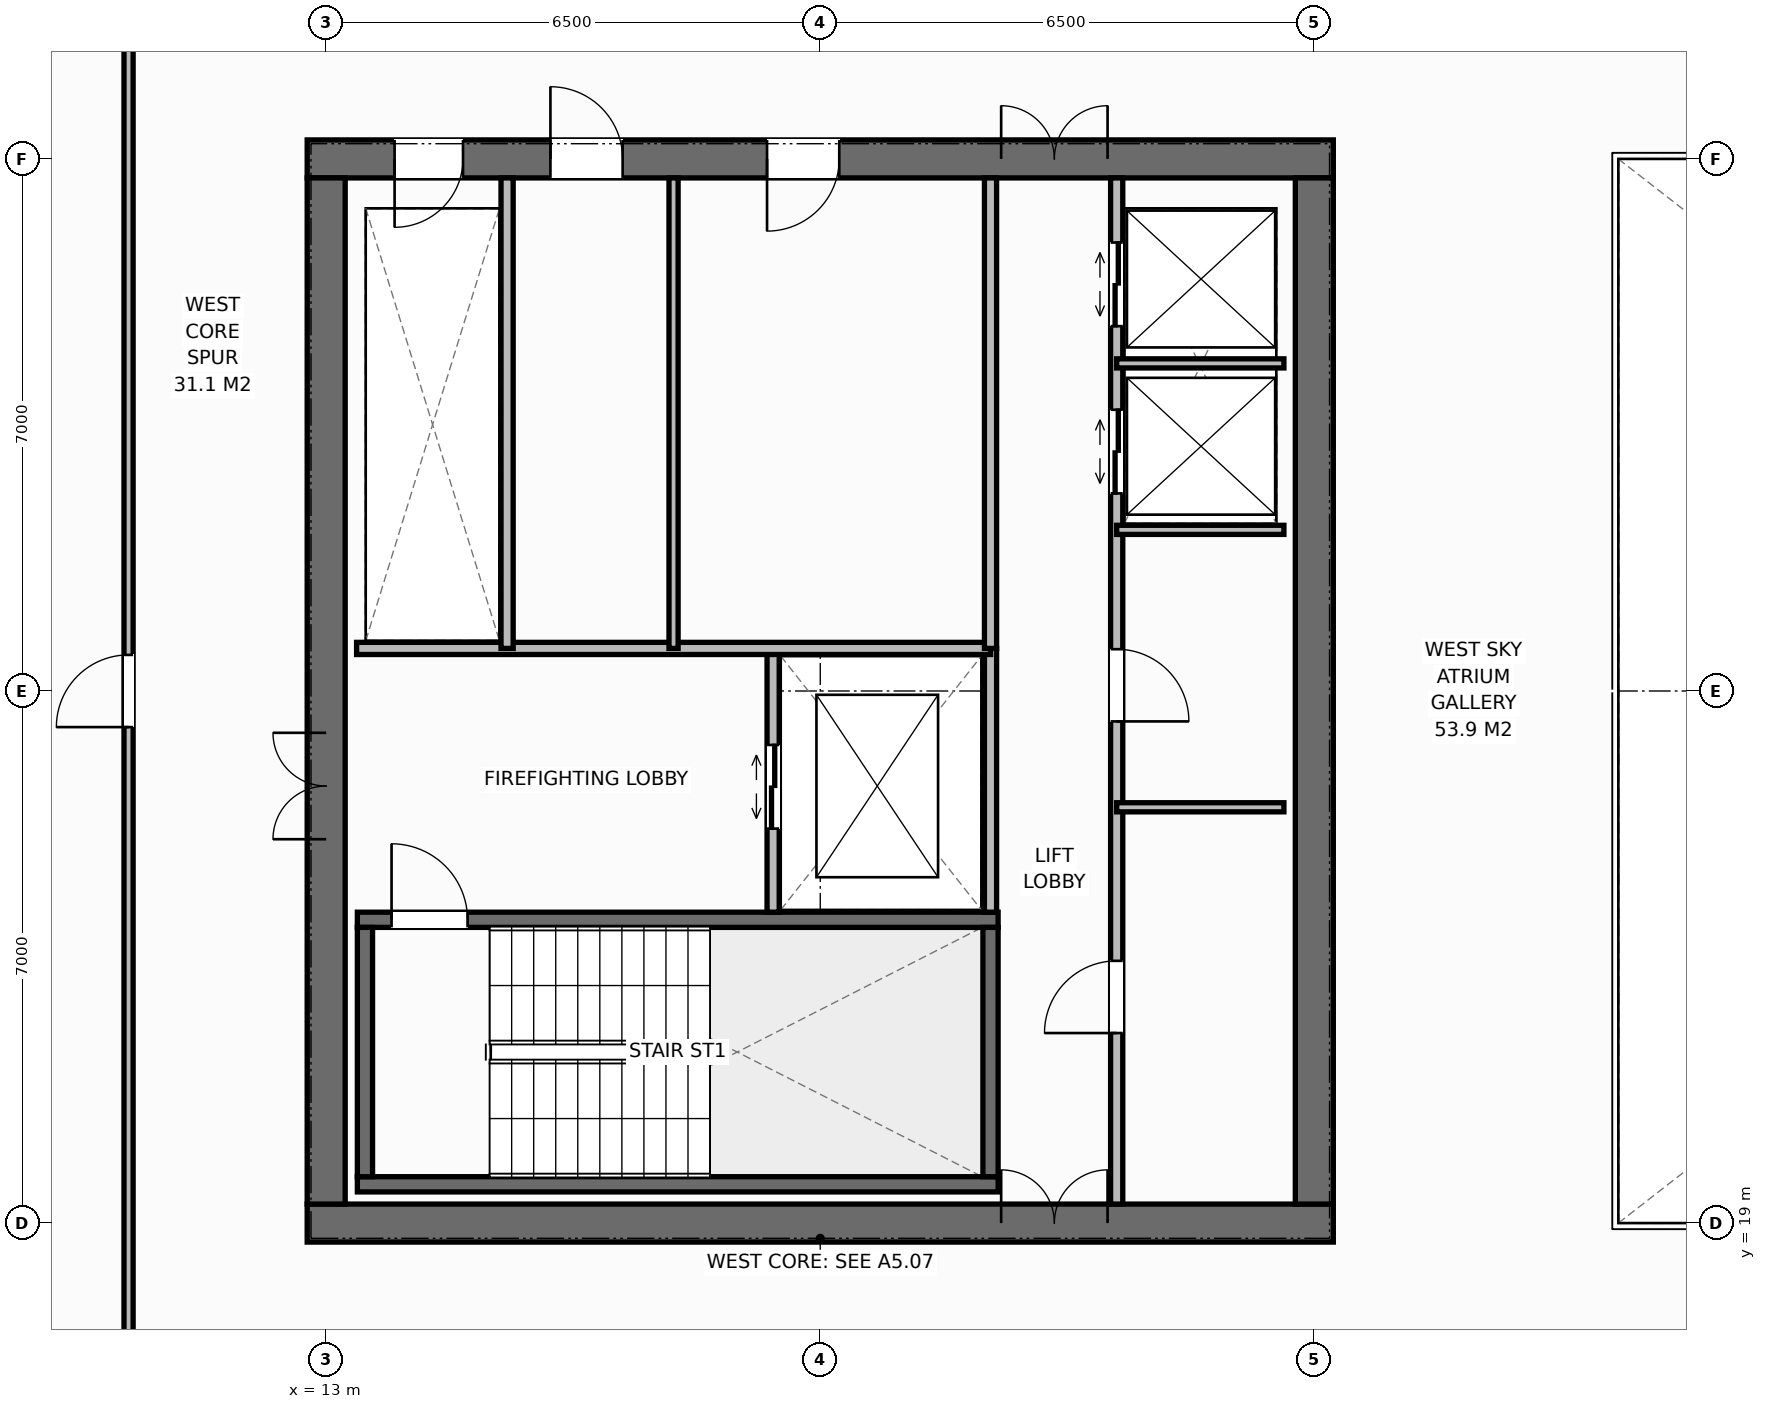
"""IFC4 building model, lengths in metres.
Left out: names, types, materials, properties, quantities, classifications, styles, units other than length and angle.
Written with IfcOpenShell. Run it as: python <this file> out.ifc"""

import sys

from ifc_helpers import new_model, si_unit, direction, frame, frame_2d, origin, place, context, subcontext, project, spatial, rectangle, extrude, element, fill, save


model = new_model("IFC4")
c1 = context("Model", 3, precision=1e-05, world=origin(), true_north=direction((0.0, 1.0)))
c2 = subcontext(c1, "Body", "Model", "MODEL_VIEW")
j1 = project(units=[si_unit("LENGTHUNIT", "METRE"), si_unit("PLANEANGLEUNIT", "RADIAN")], contexts=[c1])
p1 = place(None, origin())
s1 = spatial("IfcSite", under=j1, at=p1, CompositionType="ELEMENT")
p2 = place(p1, origin())
s2 = spatial("IfcBuilding", under=s1, at=p2, CompositionType="ELEMENT")
p3 = place(p2, frame((0.0, 0.0, 202.4)))
s3 = spatial("IfcBuildingStorey", under=s2, at=p3, CompositionType="ELEMENT", Elevation=202.4)
p4 = place(p3, frame((12.75, 19.0, 0.0), z_axis=(0.0, 0.0, 1.0), x_axis=(1.0, 0.0, 0.0)))
e1 = element("IfcWall", 1, at=p4, inside=s3, PredefinedType="SHEAR", context=c2, shape_type="SweptSolid", body=[
    extrude(rectangle(XDim=13.5, YDim=0.5, at=frame_2d((6.75, 0.0))), origin(), (0.0, 0.0, 1.0), 3.8),
])
p5 = place(p4, frame((9.13, 0.0, 0.0)))
e2 = element("IfcOpeningElement", 2, at=p5, cuts=e1, PredefinedType="OPENING", context=c2, shape_type="SweptSolid", body=[
    extrude(rectangle(XDim=1.4, YDim=2.2, at=frame_2d((0.7, 1.1))), frame((0.0, 0.26, 0.0), z_axis=(0.0, -1.0, 0.0), x_axis=(1.0, 0.0, 0.0)), (0.0, 0.0, 1.0), 0.52),
])
p6 = place(p3, frame((12.75, 33.0, 0.0), z_axis=(0.0, 0.0, 1.0), x_axis=(1.0, 0.0, 0.0)))
e3 = element("IfcWall", 3, at=p6, inside=s3, PredefinedType="SHEAR", context=c2, shape_type="SweptSolid", body=[
    extrude(rectangle(XDim=13.5, YDim=0.5, at=frame_2d((6.75, 0.0))), origin(), (0.0, 0.0, 1.0), 3.8),
])
p7 = place(p6, frame((1.15, 0.0, 0.0)))
e4 = element("IfcOpeningElement", 4, at=p7, cuts=e3, PredefinedType="OPENING", context=c2, shape_type="SweptSolid", body=[
    extrude(rectangle(XDim=0.9, YDim=2.15, at=frame_2d((0.45, 1.075))), frame((0.0, 0.26, 0.0), z_axis=(0.0, -1.0, 0.0), x_axis=(1.0, 0.0, 0.0)), (0.0, 0.0, 1.0), 0.52),
])
p8 = place(p6, frame((3.2, 0.0, 0.0)))
e5 = element("IfcOpeningElement", 5, at=p8, cuts=e3, PredefinedType="OPENING", context=c2, shape_type="SweptSolid", body=[
    extrude(rectangle(XDim=0.95, YDim=2.15, at=frame_2d((0.475, 1.075))), frame((0.0, 0.26, 0.0), z_axis=(0.0, -1.0, 0.0), x_axis=(1.0, 0.0, 0.0)), (0.0, 0.0, 1.0), 0.52),
])
p9 = place(p6, frame((6.05, 0.0, 0.0)))
e6 = element("IfcOpeningElement", 6, at=p9, cuts=e3, PredefinedType="OPENING", context=c2, shape_type="SweptSolid", body=[
    extrude(rectangle(XDim=0.95, YDim=2.15, at=frame_2d((0.475, 1.075))), frame((0.0, 0.26, 0.0), z_axis=(0.0, -1.0, 0.0), x_axis=(1.0, 0.0, 0.0)), (0.0, 0.0, 1.0), 0.52),
])
p10 = place(p6, frame((9.13, 0.0, 0.0)))
e7 = element("IfcOpeningElement", 7, at=p10, cuts=e3, PredefinedType="OPENING", context=c2, shape_type="SweptSolid", body=[
    extrude(rectangle(XDim=1.4, YDim=2.2, at=frame_2d((0.7, 1.1))), frame((0.0, 0.26, 0.0), z_axis=(0.0, -1.0, 0.0), x_axis=(1.0, 0.0, 0.0)), (0.0, 0.0, 1.0), 0.52),
])
p11 = place(p3, frame((13.0, 19.25, 0.0), z_axis=(0.0, 0.0, 1.0), x_axis=(0.0, 1.0, 0.0)))
e8 = element("IfcWall", 8, at=p11, inside=s3, PredefinedType="SHEAR", context=c2, shape_type="SweptSolid", body=[
    extrude(rectangle(XDim=13.5, YDim=0.5, at=frame_2d((6.75, 0.0))), origin(), (0.0, 0.0, 1.0), 3.8),
])
p12 = place(p11, frame((4.8, 0.0, 0.0)))
e9 = element("IfcOpeningElement", 9, at=p12, cuts=e8, PredefinedType="OPENING", context=c2, shape_type="SweptSolid", body=[
    extrude(rectangle(XDim=1.4, YDim=2.2, at=frame_2d((0.7, 1.1))), frame((0.0, 0.26, 0.0), z_axis=(0.0, -1.0, 0.0), x_axis=(1.0, 0.0, 0.0)), (0.0, 0.0, 1.0), 0.52),
])
p13 = place(p3, frame((26.0, 19.25, 0.0), z_axis=(0.0, 0.0, 1.0), x_axis=(0.0, 1.0, 0.0)))
e10 = element("IfcWall", 10, at=p13, inside=s3, PredefinedType="SHEAR", context=c2, shape_type="SweptSolid", body=[
    extrude(rectangle(XDim=13.5, YDim=0.5, at=frame_2d((6.75, 0.0))), origin(), (0.0, 0.0, 1.0), 3.8),
])
p14 = place(p3, frame((13.41, 19.51, 0.0), z_axis=(0.0, 0.0, 1.0), x_axis=(1.0, 0.0, 0.0)))
e11 = element("IfcWall", 11, at=p14, inside=s3, PredefinedType="SHEAR", context=c2, shape_type="SweptSolid", body=[
    extrude(rectangle(XDim=8.43, YDim=0.2, at=frame_2d((4.215, 0.0))), origin(), (0.0, 0.0, 1.0), 3.8),
])
p15 = place(p3, frame((13.41, 22.99, 0.0), z_axis=(0.0, 0.0, 1.0), x_axis=(1.0, 0.0, 0.0)))
e12 = element("IfcWall", 12, at=p15, inside=s3, PredefinedType="SHEAR", context=c2, shape_type="SweptSolid", body=[
    extrude(rectangle(XDim=8.43, YDim=0.2, at=frame_2d((4.215, 0.0))), origin(), (0.0, 0.0, 1.0), 3.8),
])
p16 = place(p15, frame((0.45, 0.0, 0.0)))
e13 = element("IfcOpeningElement", 13, at=p16, cuts=e12, PredefinedType="OPENING", context=c2, shape_type="SweptSolid", body=[
    extrude(rectangle(XDim=1.0, YDim=2.15, at=frame_2d((0.5, 1.075))), frame((0.0, 0.11, 0.0), z_axis=(0.0, -1.0, 0.0), x_axis=(1.0, 0.0, 0.0)), (0.0, 0.0, 1.0), 0.22),
])
for number, where, z_axis, x_axis in (
    (14, (13.51, 19.61, 0.0), (0.0, 0.0, 1.0), (0.0, 1.0, 0.0)),
    (15, (21.74, 19.61, 0.0), (0.0, 0.0, 1.0), (0.0, 1.0, 0.0)),
):
    element("IfcWall", number, at=place(p3, frame(where, z_axis=z_axis, x_axis=x_axis)), inside=s3, PredefinedType="SHEAR", context=c2, shape_type="SweptSolid", body=[
        extrude(rectangle(XDim=3.28, YDim=0.2, at=frame_2d((1.64, 0.0))), origin(), (0.0, 0.0, 1.0), 3.8),
    ])
p17 = place(p3, frame((21.74, 23.09, 0.0), z_axis=(0.0, 0.0, 1.0), x_axis=(0.0, 1.0, 0.0)))
e16 = element("IfcWall", 16, at=p17, inside=s3, PredefinedType="STANDARD", context=c2, shape_type="SweptSolid", body=[
    extrude(rectangle(XDim=3.47, YDim=0.16, at=frame_2d((1.735, 0.0))), origin(), (0.0, 0.0, 1.0), 3.58),
])
p18 = place(p3, frame((18.88, 23.09, 0.0), z_axis=(0.0, 0.0, 1.0), x_axis=(0.0, 1.0, 0.0)))
e17 = element("IfcWall", 17, at=p18, inside=s3, PredefinedType="STANDARD", context=c2, shape_type="SweptSolid", body=[
    extrude(rectangle(XDim=3.47, YDim=0.16, at=frame_2d((1.735, 0.0))), origin(), (0.0, 0.0, 1.0), 3.58),
])
p19 = place(p18, frame((1.1, 0.0, 0.0)))
e18 = element("IfcOpeningElement", 18, at=p19, cuts=e17, PredefinedType="OPENING", context=c2, shape_type="SweptSolid", body=[
    extrude(rectangle(XDim=1.1, YDim=2.2, at=frame_2d((0.55, 1.1))), frame((0.0, 0.09, 0.0), z_axis=(0.0, -1.0, 0.0), x_axis=(1.0, 0.0, 0.0)), (0.0, 0.0, 1.0), 0.18),
])
p20 = place(p3, frame((13.4, 26.56, 0.0), z_axis=(0.0, 0.0, 1.0), x_axis=(1.0, 0.0, 0.0)))
e19 = element("IfcWall", 19, at=p20, inside=s3, PredefinedType="STANDARD", context=c2, shape_type="SweptSolid", body=[
    extrude(rectangle(XDim=8.34, YDim=0.16, at=frame_2d((4.17, 0.0))), origin(), (0.0, 0.0, 1.0), 3.58),
])
p21 = place(p3, frame((15.38, 26.56, 0.0), z_axis=(0.0, 0.0, 1.0), x_axis=(0.0, 1.0, 0.0)))
e20 = element("IfcWall", 20, at=p21, inside=s3, PredefinedType="STANDARD", context=c2, shape_type="SweptSolid", body=[
    extrude(rectangle(XDim=6.19, YDim=0.16, at=frame_2d((3.095, 0.0))), origin(), (0.0, 0.0, 1.0), 3.58),
])
p22 = place(p3, frame((17.57, 26.56, 0.0), z_axis=(0.0, 0.0, 1.0), x_axis=(0.0, 1.0, 0.0)))
e21 = element("IfcWall", 21, at=p22, inside=s3, PredefinedType="PARTITIONING", context=c2, shape_type="SweptSolid", body=[
    extrude(rectangle(XDim=6.19, YDim=0.12, at=frame_2d((3.095, 0.0))), origin(), (0.0, 0.0, 1.0), 3.58),
])
p23 = place(p3, frame((21.74, 26.56, 0.0), z_axis=(0.0, 0.0, 1.0), x_axis=(0.0, 1.0, 0.0)))
e22 = element("IfcWall", 22, at=p23, inside=s3, PredefinedType="STANDARD", context=c2, shape_type="SweptSolid", body=[
    extrude(rectangle(XDim=6.19, YDim=0.16, at=frame_2d((3.095, 0.0))), origin(), (0.0, 0.0, 1.0), 3.58),
])
p24 = place(p3, frame((23.4, 19.25, 0.0), z_axis=(0.0, 0.0, 1.0), x_axis=(0.0, 1.0, 0.0)))
e23 = element("IfcWall", 23, at=p24, inside=s3, PredefinedType="STANDARD", context=c2, shape_type="SweptSolid", body=[
    extrude(rectangle(XDim=13.5, YDim=0.16, at=frame_2d((6.75, 0.0))), origin(), (0.0, 0.0, 1.0), 3.58),
])
p25 = place(p24, frame((2.25, 0.0, 0.0)))
e24 = element("IfcOpeningElement", 24, at=p25, cuts=e23, PredefinedType="OPENING", context=c2, shape_type="SweptSolid", body=[
    extrude(rectangle(XDim=0.95, YDim=2.15, at=frame_2d((0.475, 1.075))), frame((0.0, 0.09, 0.0), z_axis=(0.0, -1.0, 0.0), x_axis=(1.0, 0.0, 0.0)), (0.0, 0.0, 1.0), 0.18),
])
p26 = place(p24, frame((6.35, 0.0, 0.0)))
e25 = element("IfcOpeningElement", 25, at=p26, cuts=e23, PredefinedType="OPENING", context=c2, shape_type="SweptSolid", body=[
    extrude(rectangle(XDim=0.95, YDim=2.15, at=frame_2d((0.475, 1.075))), frame((0.0, 0.09, 0.0), z_axis=(0.0, -1.0, 0.0), x_axis=(1.0, 0.0, 0.0)), (0.0, 0.0, 1.0), 0.18),
])
p27 = place(p24, frame((9.35, 0.0, 0.0)))
e26 = element("IfcOpeningElement", 26, at=p27, cuts=e23, PredefinedType="OPENING", context=c2, shape_type="SweptSolid", body=[
    extrude(rectangle(XDim=1.1, YDim=2.2, at=frame_2d((0.55, 1.1))), frame((0.0, 0.09, 0.0), z_axis=(0.0, -1.0, 0.0), x_axis=(1.0, 0.0, 0.0)), (0.0, 0.0, 1.0), 0.18),
])
p28 = place(p24, frame((11.55, 0.0, 0.0)))
e27 = element("IfcOpeningElement", 27, at=p28, cuts=e23, PredefinedType="OPENING", context=c2, shape_type="SweptSolid", body=[
    extrude(rectangle(XDim=1.1, YDim=2.2, at=frame_2d((0.55, 1.1))), frame((0.0, 0.09, 0.0), z_axis=(0.0, -1.0, 0.0), x_axis=(1.0, 0.0, 0.0)), (0.0, 0.0, 1.0), 0.18),
])
for number, where, z_axis, x_axis in (
    (28, (23.4, 24.47, 0.0), (0.0, 0.0, 1.0), (1.0, 0.0, 0.0)),
    (29, (23.4, 28.12, 0.0), (0.0, 0.0, 1.0), (1.0, 0.0, 0.0)),
    (30, (23.4, 30.31, 0.0), (0.0, 0.0, 1.0), (1.0, 0.0, 0.0)),
):
    element("IfcWall", number, at=place(p3, frame(where, z_axis=z_axis, x_axis=x_axis)), inside=s3, PredefinedType="PARTITIONING", context=c2, shape_type="SweptSolid", body=[
        extrude(rectangle(XDim=2.2, YDim=0.12, at=frame_2d((1.1, 0.0))), origin(), (0.0, 0.0, 1.0), 3.58),
    ])
p29 = place(p3, frame((10.4, 16.5, 0.0), z_axis=(0.0, 0.0, 1.0), x_axis=(0.0, 1.0, 0.0)))
e31 = element("IfcWall", 31, at=p29, inside=s3, PredefinedType="PARTITIONING", context=c2, shape_type="SweptSolid", body=[
    extrude(rectangle(XDim=19.0, YDim=0.12, at=frame_2d((9.5, 0.0))), origin(), (0.0, 0.0, 1.0), 3.58),
])
p30 = place(p29, frame((9.025, 0.0, 0.0)))
e32 = element("IfcOpeningElement", 32, at=p30, cuts=e31, PredefinedType="OPENING", context=c2, shape_type="SweptSolid", body=[
    extrude(rectangle(XDim=0.95, YDim=2.15, at=frame_2d((0.475, 1.075))), frame((0.0, 0.07, 0.0), z_axis=(0.0, -1.0, 0.0), x_axis=(1.0, 0.0, 0.0)), (0.0, 0.0, 1.0), 0.14),
])
p31 = place(p16, origin())
e33 = element("IfcDoor", 33, at=p31, inside=s3, OperationType="SINGLE_SWING_LEFT", PredefinedType="DOOR", context=c2, shape_type="SweptSolid", body=[
    extrude(rectangle(XDim=1.0, YDim=2.15, at=frame_2d((0.5, 1.075))), frame((0.0, 0.025, 0.0), z_axis=(0.0, -1.0, 0.0), x_axis=(1.0, 0.0, 0.0)), (0.0, 0.0, 1.0), 0.05),
])
fill(e13, e33)
p32 = place(p12, origin())
e34 = element("IfcDoor", 34, at=p32, inside=s3, OperationType="DOUBLE_DOOR_SINGLE_SWING", PredefinedType="DOOR", context=c2, shape_type="SweptSolid", body=[
    extrude(rectangle(XDim=1.4, YDim=2.2, at=frame_2d((0.7, 1.1))), frame((0.0, 0.025, 0.0), z_axis=(0.0, -1.0, 0.0), x_axis=(1.0, 0.0, 0.0)), (0.0, 0.0, 1.0), 0.05),
])
fill(e9, e34)
p33 = place(p19, origin())
e35 = element("IfcDoor", 35, at=p33, inside=s3, OperationType="DOUBLE_DOOR_SLIDING", PredefinedType="DOOR", context=c2, shape_type="SweptSolid", body=[
    extrude(rectangle(XDim=1.1, YDim=2.2, at=frame_2d((0.55, 1.1))), frame((0.0, 0.025, 0.0), z_axis=(0.0, -1.0, 0.0), x_axis=(1.0, 0.0, 0.0)), (0.0, 0.0, 1.0), 0.05),
])
fill(e18, e35)
p34 = place(p7, origin())
e36 = element("IfcDoor", 36, at=p34, inside=s3, OperationType="SINGLE_SWING_RIGHT", PredefinedType="DOOR", context=c2, shape_type="SweptSolid", body=[
    extrude(rectangle(XDim=0.9, YDim=2.15, at=frame_2d((0.45, 1.075))), frame((0.0, -0.025, 0.0), z_axis=(0.0, -1.0, 0.0), x_axis=(1.0, 0.0, 0.0)), (0.0, 0.0, 1.0), 0.05),
])
fill(e4, e36)
p35 = place(p8, origin())
e37 = element("IfcDoor", 37, at=p35, inside=s3, OperationType="SINGLE_SWING_LEFT", PredefinedType="DOOR", context=c2, shape_type="SweptSolid", body=[
    extrude(rectangle(XDim=0.95, YDim=2.15, at=frame_2d((0.475, 1.075))), frame((0.0, -0.025, 0.0), z_axis=(0.0, -1.0, 0.0), x_axis=(1.0, 0.0, 0.0)), (0.0, 0.0, 1.0), 0.05),
])
fill(e5, e37)
p36 = place(p9, origin())
e38 = element("IfcDoor", 38, at=p36, inside=s3, OperationType="SINGLE_SWING_RIGHT", PredefinedType="DOOR", context=c2, shape_type="SweptSolid", body=[
    extrude(rectangle(XDim=0.95, YDim=2.15, at=frame_2d((0.475, 1.075))), frame((0.0, -0.025, 0.0), z_axis=(0.0, -1.0, 0.0), x_axis=(1.0, 0.0, 0.0)), (0.0, 0.0, 1.0), 0.05),
])
fill(e6, e38)
p37 = place(p5, origin())
e39 = element("IfcDoor", 39, at=p37, inside=s3, OperationType="DOUBLE_DOOR_SINGLE_SWING", PredefinedType="DOOR", context=c2, shape_type="SweptSolid", body=[
    extrude(rectangle(XDim=1.4, YDim=2.2, at=frame_2d((0.7, 1.1))), frame((0.0, 0.075, 0.0), z_axis=(0.0, -1.0, 0.0), x_axis=(1.0, 0.0, 0.0)), (0.0, 0.0, 1.0), 0.05),
])
fill(e2, e39)
p38 = place(p10, origin())
e40 = element("IfcDoor", 40, at=p38, inside=s3, OperationType="DOUBLE_DOOR_SINGLE_SWING", PredefinedType="DOOR", context=c2, shape_type="SweptSolid", body=[
    extrude(rectangle(XDim=1.4, YDim=2.2, at=frame_2d((0.7, 1.1))), frame((0.0, -0.025, 0.0), z_axis=(0.0, -1.0, 0.0), x_axis=(1.0, 0.0, 0.0)), (0.0, 0.0, 1.0), 0.05),
])
fill(e7, e40)
p39 = place(p25, origin())
e41 = element("IfcDoor", 41, at=p39, inside=s3, OperationType="SINGLE_SWING_LEFT", PredefinedType="DOOR", context=c2, shape_type="SweptSolid", body=[
    extrude(rectangle(XDim=0.95, YDim=2.15, at=frame_2d((0.475, 1.075))), frame((0.0, 0.025, 0.0), z_axis=(0.0, -1.0, 0.0), x_axis=(1.0, 0.0, 0.0)), (0.0, 0.0, 1.0), 0.05),
])
fill(e24, e41)
p40 = place(p26, origin())
e42 = element("IfcDoor", 42, at=p40, inside=s3, OperationType="SINGLE_SWING_RIGHT", PredefinedType="DOOR", context=c2, shape_type="SweptSolid", body=[
    extrude(rectangle(XDim=0.95, YDim=2.15, at=frame_2d((0.475, 1.075))), frame((0.0, 0.025, 0.0), z_axis=(0.0, -1.0, 0.0), x_axis=(1.0, 0.0, 0.0)), (0.0, 0.0, 1.0), 0.05),
])
fill(e25, e42)
p41 = place(p27, origin())
e43 = element("IfcDoor", 43, at=p41, inside=s3, OperationType="DOUBLE_DOOR_SLIDING", PredefinedType="DOOR", context=c2, shape_type="SweptSolid", body=[
    extrude(rectangle(XDim=1.1, YDim=2.2, at=frame_2d((0.55, 1.1))), frame((0.0, 0.025, 0.0), z_axis=(0.0, -1.0, 0.0), x_axis=(1.0, 0.0, 0.0)), (0.0, 0.0, 1.0), 0.05),
])
fill(e26, e43)
p42 = place(p28, origin())
e44 = element("IfcDoor", 44, at=p42, inside=s3, OperationType="DOUBLE_DOOR_SLIDING", PredefinedType="DOOR", context=c2, shape_type="SweptSolid", body=[
    extrude(rectangle(XDim=1.1, YDim=2.2, at=frame_2d((0.55, 1.1))), frame((0.0, 0.025, 0.0), z_axis=(0.0, -1.0, 0.0), x_axis=(1.0, 0.0, 0.0)), (0.0, 0.0, 1.0), 0.05),
])
fill(e27, e44)
p43 = place(p30, origin())
e45 = element("IfcDoor", 45, at=p43, inside=s3, OperationType="SINGLE_SWING_LEFT", PredefinedType="DOOR", context=c2, shape_type="SweptSolid", body=[
    extrude(rectangle(XDim=0.95, YDim=2.15, at=frame_2d((0.475, 1.075))), frame((0.0, 0.025, 0.0), z_axis=(0.0, -1.0, 0.0), x_axis=(1.0, 0.0, 0.0)), (0.0, 0.0, 1.0), 0.05),
])
fill(e32, e45)
save(model, sys.argv[1])
